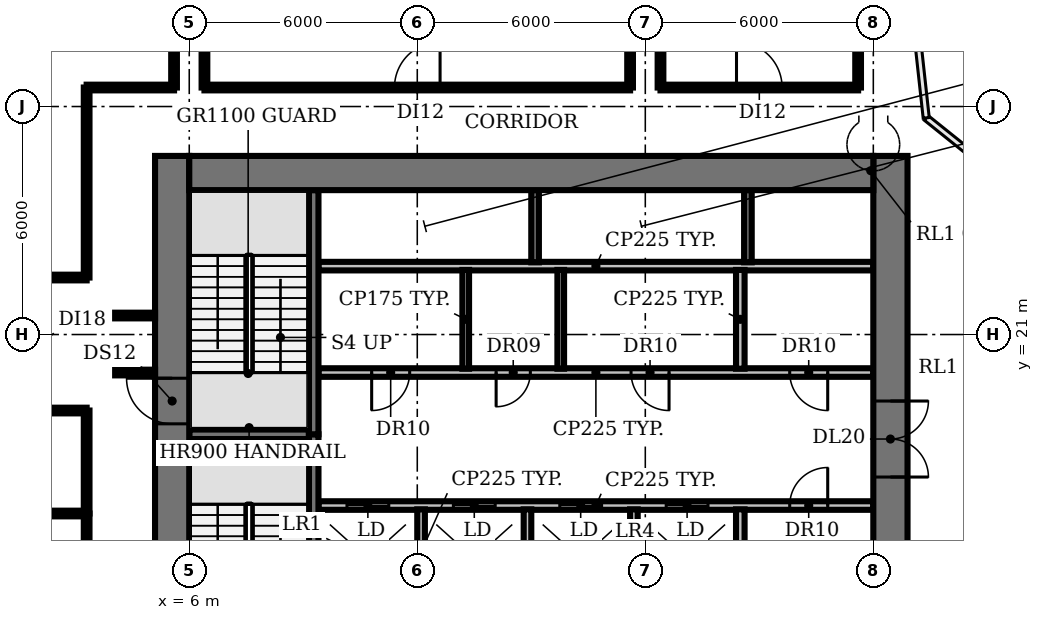
"""IFC4 building model, lengths in metres.
Left out: names, types, materials, properties, quantities, classifications, styles, units other than length and angle.
Written with IfcOpenShell. Run it as: python <this file> out.ifc"""

import sys

from ifc_helpers import new_model, si_unit, direction, frame, frame_2d, origin, place, context, subcontext, project, spatial, rectangle, extrude, element, fill, save


model = new_model("IFC4")
c1 = context("Model", 3, precision=1e-05, world=origin(), true_north=direction((0.0, 1.0)))
c2 = subcontext(c1, "Body", "Model", "MODEL_VIEW")
j1 = project(units=[si_unit("LENGTHUNIT", "METRE"), si_unit("PLANEANGLEUNIT", "RADIAN")], contexts=[c1])
p1 = place(None, origin())
s1 = spatial("IfcSite", under=j1, at=p1, CompositionType="ELEMENT")
p2 = place(p1, origin())
s2 = spatial("IfcBuilding", under=s1, at=p2, CompositionType="ELEMENT")
p3 = place(p2, frame((0.0, 0.0, 79.4)))
s3 = spatial("IfcBuildingStorey", under=s2, at=p3, CompositionType="ELEMENT", Elevation=79.4)
p4 = place(p3, frame((9.4, 16.5, 0.0), z_axis=(0.0, 0.0, 1.0), x_axis=(1.0, 0.0, 0.0)))
e1 = element("IfcWall", 1, at=p4, inside=s3, PredefinedType="PARTITIONING", context=c2, shape_type="SweptSolid", body=[
    extrude(rectangle(XDim=14.6, YDim=0.225, at=frame_2d((7.3, 0.0))), origin(), (0.0, 0.0, 1.0), 8.05),
])
p5 = place(p4, frame((0.75, 0.0, 0.0)))
e2 = element("IfcOpeningElement", 2, at=p5, cuts=e1, PredefinedType="OPENING", context=c2, shape_type="SweptSolid", body=[
    extrude(rectangle(XDim=1.1, YDim=2.1, at=frame_2d((0.55, 1.05))), frame((0.0, 0.123, 0.0), z_axis=(0.0, -1.0, 0.0), x_axis=(1.0, 0.0, 0.0)), (0.0, 0.0, 1.0), 0.245),
])
p6 = place(p4, frame((3.55, 0.0, 0.0)))
e3 = element("IfcOpeningElement", 3, at=p6, cuts=e1, PredefinedType="OPENING", context=c2, shape_type="SweptSolid", body=[
    extrude(rectangle(XDim=1.1, YDim=2.1, at=frame_2d((0.55, 1.05))), frame((0.0, 0.123, 0.0), z_axis=(0.0, -1.0, 0.0), x_axis=(1.0, 0.0, 0.0)), (0.0, 0.0, 1.0), 0.245),
])
p7 = place(p4, frame((6.35, 0.0, 0.0)))
e4 = element("IfcOpeningElement", 4, at=p7, cuts=e1, PredefinedType="OPENING", context=c2, shape_type="SweptSolid", body=[
    extrude(rectangle(XDim=1.1, YDim=2.1, at=frame_2d((0.55, 1.05))), frame((0.0, 0.123, 0.0), z_axis=(0.0, -1.0, 0.0), x_axis=(1.0, 0.0, 0.0)), (0.0, 0.0, 1.0), 0.245),
])
p8 = place(p4, frame((9.15, 0.0, 0.0)))
e5 = element("IfcOpeningElement", 5, at=p8, cuts=e1, PredefinedType="OPENING", context=c2, shape_type="SweptSolid", body=[
    extrude(rectangle(XDim=1.1, YDim=2.1, at=frame_2d((0.55, 1.05))), frame((0.0, 0.123, 0.0), z_axis=(0.0, -1.0, 0.0), x_axis=(1.0, 0.0, 0.0)), (0.0, 0.0, 1.0), 0.245),
])
p9 = place(p4, frame((12.4, 0.0, 0.0)))
e6 = element("IfcOpeningElement", 6, at=p9, cuts=e1, PredefinedType="OPENING", context=c2, shape_type="SweptSolid", body=[
    extrude(rectangle(XDim=1.0, YDim=2.1, at=frame_2d((0.5, 1.05))), frame((0.0, 0.123, 0.0), z_axis=(0.0, -1.0, 0.0), x_axis=(1.0, 0.0, 0.0)), (0.0, 0.0, 1.0), 0.245),
])
p10 = place(p3, frame((6.0, 18.375, 0.0), z_axis=(0.0, 0.0, 1.0), x_axis=(1.0, 0.0, 0.0)))
e7 = element("IfcWall", 7, at=p10, inside=s3, PredefinedType="SHEAR", context=c2, shape_type="SweptSolid", body=[
    extrude(rectangle(XDim=3.15, YDim=0.25, at=frame_2d((1.575, 0.0))), origin(), (0.0, 0.0, 1.0), 8.05),
])
p11 = place(p3, frame((24.0, 20.0, 0.0), z_axis=(0.0, 0.0, 1.0), x_axis=(-1.0, 0.0, 0.0)))
e8 = element("IfcWall", 8, at=p11, inside=s3, PredefinedType="PARTITIONING", context=c2, shape_type="SweptSolid", body=[
    extrude(rectangle(XDim=14.6, YDim=0.225, at=frame_2d((7.3, 0.0))), origin(), (0.0, 0.0, 1.0), 8.05),
])
p12 = place(p11, frame((12.2, 0.0, 0.0)))
e9 = element("IfcOpeningElement", 9, at=p12, cuts=e8, PredefinedType="OPENING", context=c2, shape_type="SweptSolid", body=[
    extrude(rectangle(XDim=1.0, YDim=2.1, at=frame_2d((0.5, 1.05))), frame((0.0, 0.123, 0.0), z_axis=(0.0, -1.0, 0.0), x_axis=(1.0, 0.0, 0.0)), (0.0, 0.0, 1.0), 0.245),
])
p13 = place(p11, frame((9.025, 0.0, 0.0)))
e10 = element("IfcOpeningElement", 10, at=p13, cuts=e8, PredefinedType="OPENING", context=c2, shape_type="SweptSolid", body=[
    extrude(rectangle(XDim=0.9, YDim=2.1, at=frame_2d((0.45, 1.05))), frame((0.0, 0.123, 0.0), z_axis=(0.0, -1.0, 0.0), x_axis=(1.0, 0.0, 0.0)), (0.0, 0.0, 1.0), 0.245),
])
p14 = place(p11, frame((5.375, 0.0, 0.0)))
e11 = element("IfcOpeningElement", 11, at=p14, cuts=e8, PredefinedType="OPENING", context=c2, shape_type="SweptSolid", body=[
    extrude(rectangle(XDim=1.0, YDim=2.1, at=frame_2d((0.5, 1.05))), frame((0.0, 0.123, 0.0), z_axis=(0.0, -1.0, 0.0), x_axis=(1.0, 0.0, 0.0)), (0.0, 0.0, 1.0), 0.245),
])
p15 = place(p11, frame((1.2, 0.0, 0.0)))
e12 = element("IfcOpeningElement", 12, at=p15, cuts=e8, PredefinedType="OPENING", context=c2, shape_type="SweptSolid", body=[
    extrude(rectangle(XDim=1.0, YDim=2.1, at=frame_2d((0.5, 1.05))), frame((0.0, 0.123, 0.0), z_axis=(0.0, -1.0, 0.0), x_axis=(1.0, 0.0, 0.0)), (0.0, 0.0, 1.0), 0.245),
])
p16 = place(p3, frame((9.4, 22.8, 0.0), z_axis=(0.0, 0.0, 1.0), x_axis=(1.0, 0.0, 0.0)))
e13 = element("IfcWall", 13, at=p16, inside=s3, PredefinedType="PARTITIONING", context=c2, shape_type="SweptSolid", body=[
    extrude(rectangle(XDim=14.6, YDim=0.225, at=frame_2d((7.3, 0.0))), origin(), (0.0, 0.0, 1.0), 8.05),
])
p17 = place(p3, frame((9.275, 18.375, 0.0), z_axis=(0.0, 0.0, 1.0), x_axis=(0.0, -1.0, 0.0)))
e14 = element("IfcWall", 14, at=p17, inside=s3, PredefinedType="SHEAR", context=c2, shape_type="SweptSolid", body=[
    extrude(rectangle(XDim=6.55, YDim=0.25, at=frame_2d((3.275, 0.0))), origin(), (0.0, 0.0, 1.0), 8.05),
])
p18 = place(p17, frame((5.075, 0.0, 0.0)))
e15 = element("IfcOpeningElement", 15, at=p18, cuts=e14, PredefinedType="OPENING", context=c2, shape_type="SweptSolid", body=[
    extrude(rectangle(XDim=1.0, YDim=2.1, at=frame_2d((0.5, 1.05))), frame((0.0, 0.135, 0.0), z_axis=(0.0, -1.0, 0.0), x_axis=(1.0, 0.0, 0.0)), (0.0, 0.0, 1.0), 0.27),
])
p19 = place(p3, frame((9.275, 18.375, 0.0), z_axis=(0.0, 0.0, 1.0), x_axis=(0.0, 1.0, 0.0)))
e16 = element("IfcWall", 16, at=p19, inside=s3, PredefinedType="SHEAR", context=c2, shape_type="SweptSolid", body=[
    extrude(rectangle(XDim=6.425, YDim=0.25, at=frame_2d((3.212, 0.0))), origin(), (0.0, 0.0, 1.0), 8.05),
])
p20 = place(p3, frame((12.1, 13.8, 0.0), z_axis=(0.0, 0.0, 1.0), x_axis=(0.0, 1.0, 0.0)))
e17 = element("IfcWall", 17, at=p20, inside=s3, PredefinedType="SOLIDWALL", context=c2, shape_type="SweptSolid", body=[
    extrude(rectangle(XDim=2.6, YDim=0.2, at=frame_2d((1.3, 0.0))), origin(), (0.0, 0.0, 1.0), 8.05),
])
p21 = place(p3, frame((13.275, 20.1, 0.0), z_axis=(0.0, 0.0, 1.0), x_axis=(0.0, 1.0, 0.0)))
e18 = element("IfcWall", 18, at=p21, inside=s3, PredefinedType="PARTITIONING", context=c2, shape_type="SweptSolid", body=[
    extrude(rectangle(XDim=2.6, YDim=0.175, at=frame_2d((1.3, 0.0))), origin(), (0.0, 0.0, 1.0), 8.05),
])
p22 = place(p3, frame((14.9, 13.8, 0.0), z_axis=(0.0, 0.0, 1.0), x_axis=(0.0, 1.0, 0.0)))
e19 = element("IfcWall", 19, at=p22, inside=s3, PredefinedType="SOLIDWALL", context=c2, shape_type="SweptSolid", body=[
    extrude(rectangle(XDim=2.6, YDim=0.2, at=frame_2d((1.3, 0.0))), origin(), (0.0, 0.0, 1.0), 8.05),
])
p23 = place(p3, frame((15.1, 22.9, 0.0), z_axis=(0.0, 0.0, 1.0), x_axis=(0.0, 1.0, 0.0)))
e20 = element("IfcWall", 20, at=p23, inside=s3, PredefinedType="SHEAR", context=c2, shape_type="SweptSolid", body=[
    extrude(rectangle(XDim=1.9, YDim=0.2, at=frame_2d((0.95, 0.0))), origin(), (0.0, 0.0, 1.0), 8.05),
])
p24 = place(p3, frame((15.775, 20.1, 0.0), z_axis=(0.0, 0.0, 1.0), x_axis=(0.0, 1.0, 0.0)))
e21 = element("IfcWall", 21, at=p24, inside=s3, PredefinedType="PARTITIONING", context=c2, shape_type="SweptSolid", body=[
    extrude(rectangle(XDim=2.6, YDim=0.175, at=frame_2d((1.3, 0.0))), origin(), (0.0, 0.0, 1.0), 8.05),
])
p25 = place(p3, frame((17.7, 13.8, 0.0), z_axis=(0.0, 0.0, 1.0), x_axis=(0.0, 1.0, 0.0)))
e22 = element("IfcWall", 22, at=p25, inside=s3, PredefinedType="SOLIDWALL", context=c2, shape_type="SweptSolid", body=[
    extrude(rectangle(XDim=2.6, YDim=0.2, at=frame_2d((1.3, 0.0))), origin(), (0.0, 0.0, 1.0), 8.05),
])
for number, where, z_axis, x_axis in (
    (23, (20.5, 13.8, 0.0), (0.0, 0.0, 1.0), (0.0, 1.0, 0.0)),
    (24, (20.5, 20.1, 0.0), (0.0, 0.0, 1.0), (0.0, 1.0, 0.0)),
):
    element("IfcWall", number, at=place(p3, frame(where, z_axis=z_axis, x_axis=x_axis)), inside=s3, PredefinedType="PARTITIONING", context=c2, shape_type="SweptSolid", body=[
        extrude(rectangle(XDim=2.6, YDim=0.225, at=frame_2d((1.3, 0.0))), origin(), (0.0, 0.0, 1.0), 8.05),
    ])
p26 = place(p3, frame((20.7, 22.9, 0.0), z_axis=(0.0, 0.0, 1.0), x_axis=(0.0, 1.0, 0.0)))
e25 = element("IfcWall", 25, at=p26, inside=s3, PredefinedType="SHEAR", context=c2, shape_type="SweptSolid", body=[
    extrude(rectangle(XDim=1.9, YDim=0.2, at=frame_2d((0.95, 0.0))), origin(), (0.0, 0.0, 1.0), 8.05),
])
p27 = place(p3, frame((5.55, 4.5, 0.0), z_axis=(0.0, 0.0, 1.0), x_axis=(0.0, 1.0, 0.0)))
e26 = element("IfcWall", 26, at=p27, inside=s3, PredefinedType="SHEAR", context=c2, shape_type="SweptSolid", body=[
    extrude(rectangle(XDim=21.2, YDim=0.9, at=frame_2d((10.6, 0.0))), origin(), (0.0, 0.0, 1.0), 8.05),
])
p28 = place(p27, frame((1.15, 0.0, 0.0)))
e27 = element("IfcOpeningElement", 27, at=p28, cuts=e26, PredefinedType="OPENING", context=c2, shape_type="SweptSolid", body=[
    extrude(rectangle(XDim=1.5, YDim=2.1, at=frame_2d((0.75, 1.05))), frame((0.0, 0.46, 0.0), z_axis=(0.0, -1.0, 0.0), x_axis=(1.0, 0.0, 0.0)), (0.0, 0.0, 1.0), 0.92),
])
p29 = place(p27, frame((7.6, 0.0, 0.0)))
e28 = element("IfcOpeningElement", 28, at=p29, cuts=e26, PredefinedType="OPENING", context=c2, shape_type="SweptSolid", body=[
    extrude(rectangle(XDim=1.2, YDim=2.1, at=frame_2d((0.6, 1.05))), frame((0.0, 0.46, 0.0), z_axis=(0.0, -1.0, 0.0), x_axis=(1.0, 0.0, 0.0)), (0.0, 0.0, 1.0), 0.92),
])
p30 = place(p27, frame((14.15, 0.0, 0.0)))
e29 = element("IfcOpeningElement", 29, at=p30, cuts=e26, PredefinedType="OPENING", context=c2, shape_type="SweptSolid", body=[
    extrude(rectangle(XDim=1.2, YDim=2.1, at=frame_2d((0.6, 1.05))), frame((0.0, 0.46, 0.0), z_axis=(0.0, -1.0, 0.0), x_axis=(1.0, 0.0, 0.0)), (0.0, 0.0, 1.0), 0.92),
])
p31 = place(p3, frame((24.45, 25.7, 0.0), z_axis=(0.0, 0.0, 1.0), x_axis=(0.0, -1.0, 0.0)))
e30 = element("IfcWall", 30, at=p31, inside=s3, PredefinedType="SHEAR", context=c2, shape_type="SweptSolid", body=[
    extrude(rectangle(XDim=21.2, YDim=0.9, at=frame_2d((10.6, 0.0))), origin(), (0.0, 0.0, 1.0), 8.05),
])
p32 = place(p31, frame((18.55, 0.0, 0.0)))
e31 = element("IfcOpeningElement", 31, at=p32, cuts=e30, PredefinedType="OPENING", context=c2, shape_type="SweptSolid", body=[
    extrude(rectangle(XDim=1.5, YDim=2.1, at=frame_2d((0.75, 1.05))), frame((0.0, 0.46, 0.0), z_axis=(0.0, -1.0, 0.0), x_axis=(1.0, 0.0, 0.0)), (0.0, 0.0, 1.0), 0.92),
])
p33 = place(p31, frame((12.45, 0.0, 0.0)))
e32 = element("IfcOpeningElement", 32, at=p33, cuts=e30, PredefinedType="OPENING", context=c2, shape_type="SweptSolid", body=[
    extrude(rectangle(XDim=0.9, YDim=2.1, at=frame_2d((0.45, 1.05))), frame((0.0, 0.46, 0.0), z_axis=(0.0, -1.0, 0.0), x_axis=(1.0, 0.0, 0.0)), (0.0, 0.0, 1.0), 0.92),
])
p34 = place(p31, frame((6.45, 0.0, 0.0)))
e33 = element("IfcOpeningElement", 33, at=p34, cuts=e30, PredefinedType="OPENING", context=c2, shape_type="SweptSolid", body=[
    extrude(rectangle(XDim=2.0, YDim=2.1, at=frame_2d((1.0, 1.05))), frame((0.0, 0.46, 0.0), z_axis=(0.0, -1.0, 0.0), x_axis=(1.0, 0.0, 0.0)), (0.0, 0.0, 1.0), 0.92),
])
p35 = place(p3, frame((6.0, 25.25, 0.0), z_axis=(0.0, 0.0, 1.0), x_axis=(1.0, 0.0, 0.0)))
e34 = element("IfcWall", 34, at=p35, inside=s3, PredefinedType="SHEAR", context=c2, shape_type="SweptSolid", body=[
    extrude(rectangle(XDim=18.0, YDim=0.9, at=frame_2d((9.0, 0.0))), origin(), (0.0, 0.0, 1.0), 8.05),
])
p36 = place(p3, frame((0.4, 16.29, 0.0), z_axis=(0.0, 0.0, 1.0), x_axis=(1.0, 0.0, 0.0)))
e35 = element("IfcWall", 35, at=p36, inside=s3, PredefinedType="PARTITIONING", context=c2, shape_type="SweptSolid", body=[
    extrude(rectangle(XDim=2.9, YDim=0.15, at=frame_2d((1.45, 0.0))), origin(), (0.0, 0.0, 1.0), 6.33),
])
for number, where, z_axis, x_axis in (
    (36, (2.19, 19.0, 0.0), (0.0, 0.0, 1.0), (1.0, 0.0, 0.0)),
    (37, (2.19, 22.5, 0.0), (0.0, 0.0, 1.0), (1.0, 0.0, 0.0)),
):
    element("IfcWall", number, at=place(p3, frame(where, z_axis=z_axis, x_axis=x_axis)), inside=s3, PredefinedType="PARTITIONING", context=c2, shape_type="SweptSolid", body=[
        extrude(rectangle(XDim=1.11, YDim=0.15, at=frame_2d((0.555, 0.0))), origin(), (0.0, 0.0, 1.0), 6.33),
    ])
p37 = place(p3, frame((3.3, 12.99, 0.0), z_axis=(0.0, 0.0, 1.0), x_axis=(0.0, 1.0, 0.0)))
e38 = element("IfcWall", 38, at=p37, inside=s3, PredefinedType="PARTITIONING", context=c2, shape_type="SweptSolid", body=[
    extrude(rectangle(XDim=3.3, YDim=0.15, at=frame_2d((1.65, 0.0))), origin(), (0.0, 0.0, 1.0), 6.33),
])
p38 = place(p37, frame((1.3, 0.0, 0.0)))
e39 = element("IfcOpeningElement", 39, at=p38, cuts=e38, PredefinedType="OPENING", context=c2, shape_type="SweptSolid", body=[
    extrude(rectangle(XDim=0.9, YDim=2.1, at=frame_2d((0.45, 1.05))), frame((0.0, 0.085, 0.0), z_axis=(0.0, -1.0, 0.0), x_axis=(1.0, 0.0, 0.0)), (0.0, 0.0, 1.0), 0.17),
])
p39 = place(p3, frame((3.3, 16.29, 0.0), z_axis=(0.0, 0.0, 1.0), x_axis=(0.0, 1.0, 0.0)))
e40 = element("IfcWall", 40, at=p39, inside=s3, PredefinedType="PARTITIONING", context=c2, shape_type="SweptSolid", body=[
    extrude(rectangle(XDim=2.71, YDim=0.15, at=frame_2d((1.355, 0.0))), origin(), (0.0, 0.0, 1.0), 6.33),
])
p40 = place(p3, frame((3.3, 22.5, 0.0), z_axis=(0.0, 0.0, 1.0), x_axis=(0.0, 1.0, 0.0)))
e41 = element("IfcWall", 41, at=p40, inside=s3, PredefinedType="PARTITIONING", context=c2, shape_type="SweptSolid", body=[
    extrude(rectangle(XDim=5.0, YDim=0.15, at=frame_2d((2.5, 0.0))), origin(), (0.0, 0.0, 1.0), 6.33),
])
p41 = place(p3, frame((3.3, 27.5, 0.0), z_axis=(0.0, 0.0, 1.0), x_axis=(1.0, 0.0, 0.0)))
e42 = element("IfcWall", 42, at=p41, inside=s3, PredefinedType="PARTITIONING", context=c2, shape_type="SweptSolid", body=[
    extrude(rectangle(XDim=2.3, YDim=0.15, at=frame_2d((1.15, 0.0))), origin(), (0.0, 0.0, 1.0), 6.33),
])
for number, where, z_axis, x_axis in (
    (43, (4.05, 20.0, 0.0), (0.0, 0.0, 1.0), (1.0, 0.0, 0.0)),
    (44, (4.05, 21.5, 0.0), (0.0, 0.0, 1.0), (1.0, 0.0, 0.0)),
):
    element("IfcWall", number, at=place(p3, frame(where, z_axis=z_axis, x_axis=x_axis)), inside=s3, PredefinedType="PARTITIONING", context=c2, shape_type="SweptSolid", body=[
        extrude(rectangle(XDim=1.05, YDim=0.15, at=frame_2d((0.525, 0.0))), origin(), (0.0, 0.0, 1.0), 6.33),
    ])
p42 = place(p3, frame((5.6, 27.5, 0.0), z_axis=(0.0, 0.0, 1.0), x_axis=(0.0, 1.0, 0.0)))
e45 = element("IfcWall", 45, at=p42, inside=s3, PredefinedType="PARTITIONING", context=c2, shape_type="SweptSolid", body=[
    extrude(rectangle(XDim=35.465, YDim=0.15, at=frame_2d((17.732, 0.0))), origin(), (0.0, 0.0, 1.0), 6.33),
])
p43 = place(p3, frame((6.4, 27.5, 0.0), z_axis=(0.0, 0.0, 1.0), x_axis=(0.0, 1.0, 0.0)))
e46 = element("IfcWall", 46, at=p43, inside=s3, PredefinedType="PARTITIONING", context=c2, shape_type="SweptSolid", body=[
    extrude(rectangle(XDim=35.5, YDim=0.15, at=frame_2d((17.75, 0.0))), origin(), (0.0, 0.0, 1.0), 6.33),
])
p44 = place(p3, frame((6.4, 27.5, 0.0), z_axis=(0.0, 0.0, 1.0), x_axis=(1.0, 0.0, 0.0)))
e47 = element("IfcWall", 47, at=p44, inside=s3, PredefinedType="PARTITIONING", context=c2, shape_type="SweptSolid", body=[
    extrude(rectangle(XDim=11.2, YDim=0.15, at=frame_2d((5.6, 0.0))), origin(), (0.0, 0.0, 1.0), 6.33),
])
p45 = place(p44, frame((5.0, 0.0, 0.0)))
e48 = element("IfcOpeningElement", 48, at=p45, cuts=e47, PredefinedType="OPENING", context=c2, shape_type="SweptSolid", body=[
    extrude(rectangle(XDim=1.2, YDim=2.1, at=frame_2d((0.6, 1.05))), frame((0.0, 0.085, 0.0), z_axis=(0.0, -1.0, 0.0), x_axis=(1.0, 0.0, 0.0)), (0.0, 0.0, 1.0), 0.17),
])
p46 = place(p3, frame((17.6, 27.5, 0.0), z_axis=(0.0, 0.0, 1.0), x_axis=(0.0, 1.0, 0.0)))
e49 = element("IfcWall", 49, at=p46, inside=s3, PredefinedType="PARTITIONING", context=c2, shape_type="SweptSolid", body=[
    extrude(rectangle(XDim=35.5, YDim=0.15, at=frame_2d((17.75, 0.0))), origin(), (0.0, 0.0, 1.0), 6.33),
])
p47 = place(p3, frame((18.4, 27.5, 0.0), z_axis=(0.0, 0.0, 1.0), x_axis=(0.0, 1.0, 0.0)))
e50 = element("IfcWall", 50, at=p47, inside=s3, PredefinedType="PARTITIONING", context=c2, shape_type="SweptSolid", body=[
    extrude(rectangle(XDim=35.465, YDim=0.15, at=frame_2d((17.732, 0.0))), origin(), (0.0, 0.0, 1.0), 6.33),
])
p48 = place(p3, frame((18.4, 27.5, 0.0), z_axis=(0.0, 0.0, 1.0), x_axis=(1.0, 0.0, 0.0)))
e51 = element("IfcWall", 51, at=p48, inside=s3, PredefinedType="PARTITIONING", context=c2, shape_type="SweptSolid", body=[
    extrude(rectangle(XDim=5.2, YDim=0.15, at=frame_2d((2.6, 0.0))), origin(), (0.0, 0.0, 1.0), 6.33),
])
p49 = place(p48, frame((2.0, 0.0, 0.0)))
e52 = element("IfcOpeningElement", 52, at=p49, cuts=e51, PredefinedType="OPENING", context=c2, shape_type="SweptSolid", body=[
    extrude(rectangle(XDim=1.2, YDim=2.1, at=frame_2d((0.6, 1.05))), frame((0.0, 0.085, 0.0), z_axis=(0.0, -1.0, 0.0), x_axis=(1.0, 0.0, 0.0)), (0.0, 0.0, 1.0), 0.17),
])
p50 = place(p3, frame((23.6, 27.5, 0.0), z_axis=(0.0, 0.0, 1.0), x_axis=(0.0, 1.0, 0.0)))
e53 = element("IfcWall", 53, at=p50, inside=s3, PredefinedType="PARTITIONING", context=c2, shape_type="SweptSolid", body=[
    extrude(rectangle(XDim=35.5, YDim=0.15, at=frame_2d((17.75, 0.0))), origin(), (0.0, 0.0, 1.0), 6.33),
])
p51 = place(p5, origin())
e54 = element("IfcDoor", 54, at=p51, inside=s3, OperationType="DOUBLE_DOOR_SLIDING", PredefinedType="DOOR", context=c2, shape_type="SweptSolid", body=[
    extrude(rectangle(XDim=1.1, YDim=2.1, at=frame_2d((0.55, 1.05))), frame((0.0, 0.025, 0.0), z_axis=(0.0, -1.0, 0.0), x_axis=(1.0, 0.0, 0.0)), (0.0, 0.0, 1.0), 0.05),
])
fill(e2, e54)
p52 = place(p6, origin())
e55 = element("IfcDoor", 55, at=p52, inside=s3, OperationType="DOUBLE_DOOR_SLIDING", PredefinedType="DOOR", context=c2, shape_type="SweptSolid", body=[
    extrude(rectangle(XDim=1.1, YDim=2.1, at=frame_2d((0.55, 1.05))), frame((0.0, 0.025, 0.0), z_axis=(0.0, -1.0, 0.0), x_axis=(1.0, 0.0, 0.0)), (0.0, 0.0, 1.0), 0.05),
])
fill(e3, e55)
p53 = place(p7, origin())
e56 = element("IfcDoor", 56, at=p53, inside=s3, OperationType="DOUBLE_DOOR_SLIDING", PredefinedType="DOOR", context=c2, shape_type="SweptSolid", body=[
    extrude(rectangle(XDim=1.1, YDim=2.1, at=frame_2d((0.55, 1.05))), frame((0.0, 0.025, 0.0), z_axis=(0.0, -1.0, 0.0), x_axis=(1.0, 0.0, 0.0)), (0.0, 0.0, 1.0), 0.05),
])
fill(e4, e56)
p54 = place(p8, origin())
e57 = element("IfcDoor", 57, at=p54, inside=s3, OperationType="DOUBLE_DOOR_SLIDING", PredefinedType="DOOR", context=c2, shape_type="SweptSolid", body=[
    extrude(rectangle(XDim=1.1, YDim=2.1, at=frame_2d((0.55, 1.05))), frame((0.0, 0.025, 0.0), z_axis=(0.0, -1.0, 0.0), x_axis=(1.0, 0.0, 0.0)), (0.0, 0.0, 1.0), 0.05),
])
fill(e5, e57)
p55 = place(p9, origin())
e58 = element("IfcDoor", 58, at=p55, inside=s3, OperationType="SINGLE_SWING_RIGHT", PredefinedType="DOOR", context=c2, shape_type="SweptSolid", body=[
    extrude(rectangle(XDim=1.0, YDim=2.1, at=frame_2d((0.5, 1.05))), frame((0.0, 0.025, 0.0), z_axis=(0.0, -1.0, 0.0), x_axis=(1.0, 0.0, 0.0)), (0.0, 0.0, 1.0), 0.05),
])
fill(e6, e58)
p56 = place(p12, origin())
e59 = element("IfcDoor", 59, at=p56, inside=s3, OperationType="SINGLE_SWING_RIGHT", PredefinedType="DOOR", context=c2, shape_type="SweptSolid", body=[
    extrude(rectangle(XDim=1.0, YDim=2.1, at=frame_2d((0.5, 1.05))), frame((0.0, 0.025, 0.0), z_axis=(0.0, -1.0, 0.0), x_axis=(1.0, 0.0, 0.0)), (0.0, 0.0, 1.0), 0.05),
])
fill(e9, e59)
p57 = place(p13, origin())
e60 = element("IfcDoor", 60, at=p57, inside=s3, OperationType="SINGLE_SWING_RIGHT", PredefinedType="DOOR", context=c2, shape_type="SweptSolid", body=[
    extrude(rectangle(XDim=0.9, YDim=2.1, at=frame_2d((0.45, 1.05))), frame((0.0, 0.025, 0.0), z_axis=(0.0, -1.0, 0.0), x_axis=(1.0, 0.0, 0.0)), (0.0, 0.0, 1.0), 0.05),
])
fill(e10, e60)
p58 = place(p14, origin())
e61 = element("IfcDoor", 61, at=p58, inside=s3, OperationType="SINGLE_SWING_LEFT", PredefinedType="DOOR", context=c2, shape_type="SweptSolid", body=[
    extrude(rectangle(XDim=1.0, YDim=2.1, at=frame_2d((0.5, 1.05))), frame((0.0, 0.025, 0.0), z_axis=(0.0, -1.0, 0.0), x_axis=(1.0, 0.0, 0.0)), (0.0, 0.0, 1.0), 0.05),
])
fill(e11, e61)
p59 = place(p15, origin())
e62 = element("IfcDoor", 62, at=p59, inside=s3, OperationType="SINGLE_SWING_LEFT", PredefinedType="DOOR", context=c2, shape_type="SweptSolid", body=[
    extrude(rectangle(XDim=1.0, YDim=2.1, at=frame_2d((0.5, 1.05))), frame((0.0, 0.025, 0.0), z_axis=(0.0, -1.0, 0.0), x_axis=(1.0, 0.0, 0.0)), (0.0, 0.0, 1.0), 0.05),
])
fill(e12, e62)
p60 = place(p30, origin())
e63 = element("IfcDoor", 63, at=p60, inside=s3, OperationType="SINGLE_SWING_RIGHT", PredefinedType="DOOR", context=c2, shape_type="SweptSolid", body=[
    extrude(rectangle(XDim=1.2, YDim=2.1, at=frame_2d((0.6, 1.05))), frame((0.0, 0.025, 0.0), z_axis=(0.0, -1.0, 0.0), x_axis=(1.0, 0.0, 0.0)), (0.0, 0.0, 1.0), 0.05),
])
fill(e29, e63)
p61 = place(p34, origin())
e64 = element("IfcDoor", 64, at=p61, inside=s3, OperationType="DOUBLE_DOOR_SINGLE_SWING", PredefinedType="DOOR", context=c2, shape_type="SweptSolid", body=[
    extrude(rectangle(XDim=2.0, YDim=2.1, at=frame_2d((1.0, 1.05))), frame((0.0, 0.025, 0.0), z_axis=(0.0, -1.0, 0.0), x_axis=(1.0, 0.0, 0.0)), (0.0, 0.0, 1.0), 0.05),
])
fill(e33, e64)
p62 = place(p45, origin())
e65 = element("IfcDoor", 65, at=p62, inside=s3, OperationType="SINGLE_SWING_RIGHT", PredefinedType="DOOR", context=c2, shape_type="SweptSolid", body=[
    extrude(rectangle(XDim=1.2, YDim=2.1, at=frame_2d((0.6, 1.05))), frame((0.0, 0.025, 0.0), z_axis=(0.0, -1.0, 0.0), x_axis=(1.0, 0.0, 0.0)), (0.0, 0.0, 1.0), 0.05),
])
fill(e48, e65)
p63 = place(p49, origin())
e66 = element("IfcDoor", 66, at=p63, inside=s3, OperationType="SINGLE_SWING_LEFT", PredefinedType="DOOR", context=c2, shape_type="SweptSolid", body=[
    extrude(rectangle(XDim=1.2, YDim=2.1, at=frame_2d((0.6, 1.05))), frame((0.0, 0.025, 0.0), z_axis=(0.0, -1.0, 0.0), x_axis=(1.0, 0.0, 0.0)), (0.0, 0.0, 1.0), 0.05),
])
fill(e52, e66)
save(model, sys.argv[1])
